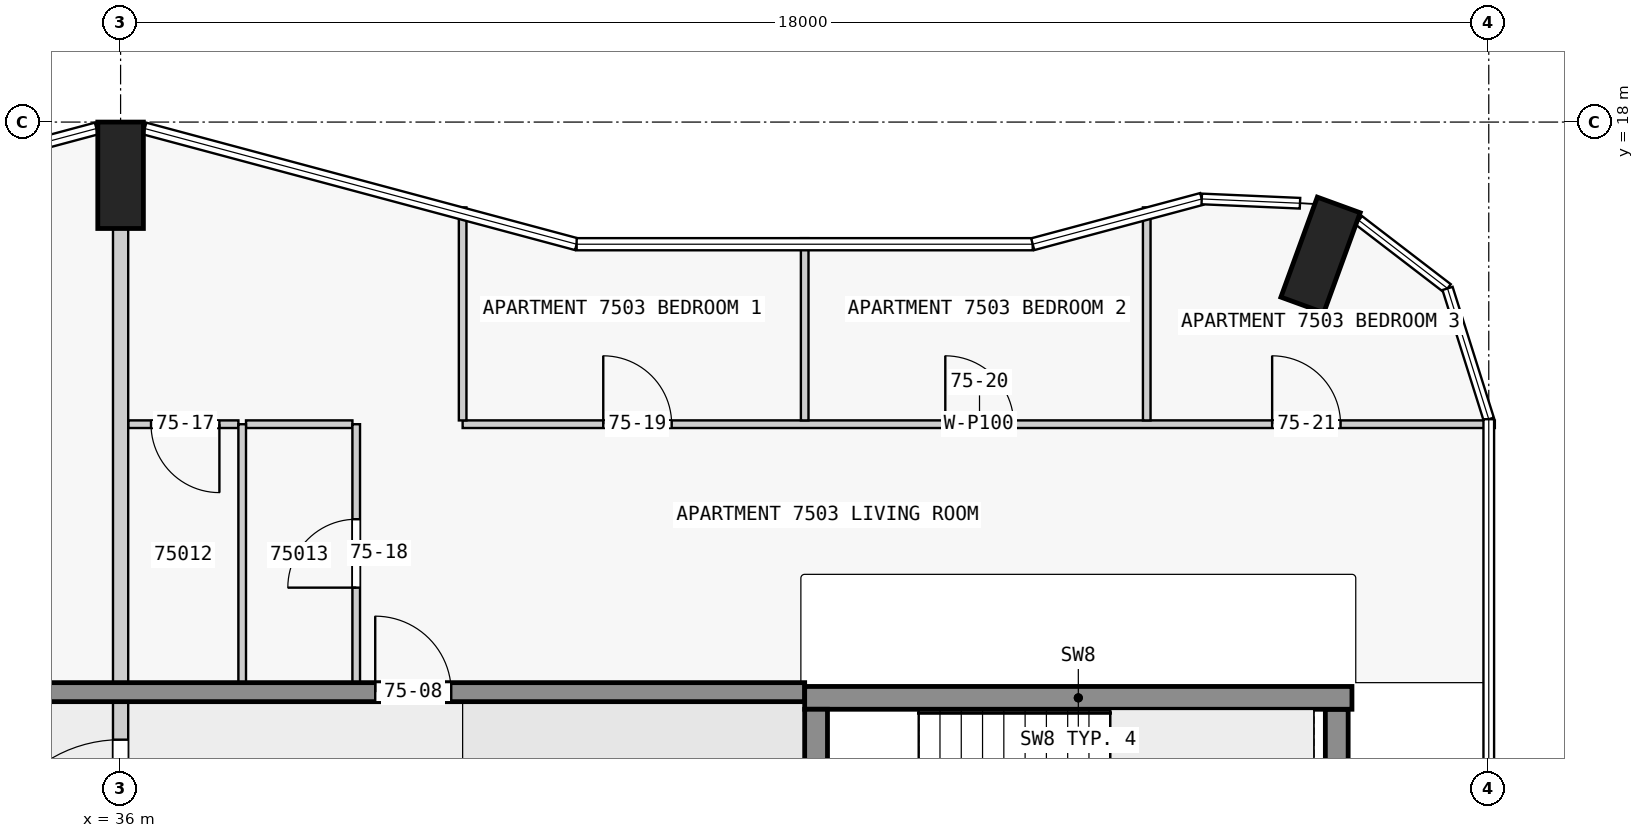
"""IFC4 building model, lengths in metres.
Left out: names, types, materials, properties, quantities, classifications, styles, units other than length and angle.
Written with IfcOpenShell. Run it as: python <this file> out.ifc"""

import sys

from ifc_helpers import new_model, si_unit, direction, frame, frame_2d, origin, origin_2d, place, context, subcontext, project, spatial, rectangle, extrude, element, fill, save


model = new_model("IFC4")
c1 = context("Model", 3, precision=1e-05, world=origin(), true_north=direction((0.0, 1.0)))
c2 = subcontext(c1, "Body", "Model", "MODEL_VIEW")
j1 = project(units=[si_unit("LENGTHUNIT", "METRE"), si_unit("PLANEANGLEUNIT", "RADIAN")], contexts=[c1])
p1 = place(None, origin())
s1 = spatial("IfcSite", under=j1, at=p1, CompositionType="ELEMENT")
p2 = place(p1, origin())
s2 = spatial("IfcBuilding", under=s1, at=p2, CompositionType="ELEMENT")
p3 = place(p2, frame((0.0, 0.0, 284.4)))
s3 = spatial("IfcBuildingStorey", under=s2, at=p3, CompositionType="ELEMENT", Elevation=284.4)
for number, where, z_axis, x_axis in (
    (1, (51.787, 16.252, 0.0), (0.0, 0.0, 1.0), (-0.94, 0.342, 0.0)),
    (2, (36.0, 17.3, 0.0), (0.0, 0.0, 1.0), (1.0, 0.0, 0.0)),
):
    element("IfcColumn", number, at=place(p3, frame(where, z_axis=z_axis, x_axis=x_axis)), inside=s3, PredefinedType="COLUMN", context=c2, shape_type="SweptSolid", body=[
        extrude(rectangle(XDim=0.6, YDim=1.4, at=origin_2d()), origin(), (0.0, 0.0, 1.0), 3.5),
    ])
p4 = place(p3, frame((45.15, 7.725, 0.0), z_axis=(0.0, 0.0, 1.0), x_axis=(0.0, 1.0, 0.0)))
e3 = element("IfcWall", 3, at=p4, inside=s3, PredefinedType="SHEAR", context=c2, shape_type="SweptSolid", body=[
    extrude(rectangle(XDim=2.55, YDim=0.3, at=frame_2d((1.275, 0.0))), origin(), (0.0, 0.0, 1.0), 3.5),
])
p5 = place(p4, frame((0.725, 0.0, 0.0)))
e4 = element("IfcOpeningElement", 4, at=p5, cuts=e3, PredefinedType="OPENING", context=c2, shape_type="SweptSolid", body=[
    extrude(rectangle(XDim=1.1, YDim=2.1, at=frame_2d((0.55, 1.05))), frame((0.0, 0.16, 0.0), z_axis=(0.0, -1.0, 0.0), x_axis=(1.0, 0.0, 0.0)), (0.0, 0.0, 1.0), 0.32),
])
p6 = place(p3, frame((52.0, 7.725, 0.0), z_axis=(0.0, 0.0, 1.0), x_axis=(0.0, 1.0, 0.0)))
e5 = element("IfcWall", 5, at=p6, inside=s3, PredefinedType="SHEAR", context=c2, shape_type="SweptSolid", body=[
    extrude(rectangle(XDim=2.55, YDim=0.3, at=frame_2d((1.275, 0.0))), origin(), (0.0, 0.0, 1.0), 3.5),
])
p7 = place(p3, frame((45.0, 10.425, 0.0), z_axis=(0.0, 0.0, 1.0), x_axis=(1.0, 0.0, 0.0)))
e6 = element("IfcWall", 6, at=p7, inside=s3, PredefinedType="SHEAR", context=c2, shape_type="SweptSolid", body=[
    extrude(rectangle(XDim=7.2, YDim=0.3, at=frame_2d((3.6, 0.0))), origin(), (0.0, 0.0, 1.0), 3.5),
])
p8 = place(p3, frame((22.5, 10.5, 0.0), z_axis=(0.0, 0.0, 1.0), x_axis=(1.0, 0.0, 0.0)))
e7 = element("IfcWall", 7, at=p8, inside=s3, PredefinedType="SHEAR", context=c2, shape_type="SweptSolid", body=[
    extrude(rectangle(XDim=22.5, YDim=0.25, at=frame_2d((11.25, 0.0))), origin(), (0.0, 0.0, 1.0), 3.05),
])
p9 = place(p8, frame((4.05, 0.0, 0.0)))
e8 = element("IfcOpeningElement", 8, at=p9, cuts=e7, PredefinedType="OPENING", context=c2, shape_type="SweptSolid", body=[
    extrude(rectangle(XDim=1.0, YDim=2.1, at=frame_2d((0.5, 1.05))), frame((0.0, 0.135, 0.0), z_axis=(0.0, -1.0, 0.0), x_axis=(1.0, 0.0, 0.0)), (0.0, 0.0, 1.0), 0.27),
])
p10 = place(p8, frame((10.35, 0.0, 0.0)))
e9 = element("IfcOpeningElement", 9, at=p10, cuts=e7, PredefinedType="OPENING", context=c2, shape_type="SweptSolid", body=[
    extrude(rectangle(XDim=1.8, YDim=2.1, at=frame_2d((0.9, 1.05))), frame((0.0, 0.135, 0.0), z_axis=(0.0, -1.0, 0.0), x_axis=(1.0, 0.0, 0.0)), (0.0, 0.0, 1.0), 0.27),
])
p11 = place(p8, frame((16.85, 0.0, 0.0)))
e10 = element("IfcOpeningElement", 10, at=p11, cuts=e7, PredefinedType="OPENING", context=c2, shape_type="SweptSolid", body=[
    extrude(rectangle(XDim=1.0, YDim=2.1, at=frame_2d((0.5, 1.05))), frame((0.0, 0.135, 0.0), z_axis=(0.0, -1.0, 0.0), x_axis=(1.0, 0.0, 0.0)), (0.0, 0.0, 1.0), 0.27),
])
p12 = place(p3, frame((37.55, 14.025, 0.0), z_axis=(0.0, 0.0, 1.0), x_axis=(-1.0, 0.0, 0.0)))
e11 = element("IfcWall", 11, at=p12, inside=s3, PredefinedType="PARTITIONING", context=c2, shape_type="SweptSolid", body=[
    extrude(rectangle(XDim=1.45, YDim=0.1, at=frame_2d((0.725, 0.0))), origin(), (0.0, 0.0, 1.0), 3.05),
])
p13 = place(p12, frame((0.25, 0.0, 0.0)))
e12 = element("IfcOpeningElement", 12, at=p13, cuts=e11, PredefinedType="OPENING", context=c2, shape_type="SweptSolid", body=[
    extrude(rectangle(XDim=0.9, YDim=2.1, at=frame_2d((0.45, 1.05))), frame((0.0, 0.06, 0.0), z_axis=(0.0, -1.0, 0.0), x_axis=(1.0, 0.0, 0.0)), (0.0, 0.0, 1.0), 0.12),
])
p14 = place(p3, frame((39.05, 14.025, 0.0), z_axis=(0.0, 0.0, 1.0), x_axis=(-1.0, 0.0, 0.0)))
e13 = element("IfcWall", 13, at=p14, inside=s3, PredefinedType="PARTITIONING", context=c2, shape_type="SweptSolid", body=[
    extrude(rectangle(XDim=1.4, YDim=0.1, at=frame_2d((0.7, 0.0))), origin(), (0.0, 0.0, 1.0), 3.05),
])
p15 = place(p3, frame((40.5, 14.025, 0.0), z_axis=(0.0, 0.0, 1.0), x_axis=(1.0, 0.0, 0.0)))
e14 = element("IfcWall", 14, at=p15, inside=s3, PredefinedType="PARTITIONING", context=c2, shape_type="SweptSolid", body=[
    extrude(rectangle(XDim=13.58, YDim=0.1, at=frame_2d((6.79, 0.0))), origin(), (0.0, 0.0, 1.0), 3.05),
])
p16 = place(p15, frame((1.85, 0.0, 0.0)))
e15 = element("IfcOpeningElement", 15, at=p16, cuts=e14, PredefinedType="OPENING", context=c2, shape_type="SweptSolid", body=[
    extrude(rectangle(XDim=0.9, YDim=2.1, at=frame_2d((0.45, 1.05))), frame((0.0, 0.06, 0.0), z_axis=(0.0, -1.0, 0.0), x_axis=(1.0, 0.0, 0.0)), (0.0, 0.0, 1.0), 0.12),
])
p17 = place(p15, frame((6.35, 0.0, 0.0)))
e16 = element("IfcOpeningElement", 16, at=p17, cuts=e14, PredefinedType="OPENING", context=c2, shape_type="SweptSolid", body=[
    extrude(rectangle(XDim=0.9, YDim=2.1, at=frame_2d((0.45, 1.05))), frame((0.0, 0.06, 0.0), z_axis=(0.0, -1.0, 0.0), x_axis=(1.0, 0.0, 0.0)), (0.0, 0.0, 1.0), 0.12),
])
p18 = place(p15, frame((10.65, 0.0, 0.0)))
e17 = element("IfcOpeningElement", 17, at=p18, cuts=e14, PredefinedType="OPENING", context=c2, shape_type="SweptSolid", body=[
    extrude(rectangle(XDim=0.9, YDim=2.1, at=frame_2d((0.45, 1.05))), frame((0.0, 0.06, 0.0), z_axis=(0.0, -1.0, 0.0), x_axis=(1.0, 0.0, 0.0)), (0.0, 0.0, 1.0), 0.12),
])
p19 = place(p3, frame((36.0, 10.625, 0.0), z_axis=(0.0, 0.0, 1.0), x_axis=(0.0, 1.0, 0.0)))
e18 = element("IfcWall", 18, at=p19, inside=s3, PredefinedType="PARTITIONING", context=c2, shape_type="SweptSolid", body=[
    extrude(rectangle(XDim=5.975, YDim=0.2, at=frame_2d((2.988, 0.0))), origin(), (0.0, 0.0, 1.0), 3.05),
])
p20 = place(p3, frame((37.6, 10.625, 0.0), z_axis=(0.0, 0.0, 1.0), x_axis=(0.0, 1.0, 0.0)))
e19 = element("IfcWall", 19, at=p20, inside=s3, PredefinedType="PARTITIONING", context=c2, shape_type="SweptSolid", body=[
    extrude(rectangle(XDim=3.4, YDim=0.1, at=frame_2d((1.7, 0.0))), origin(), (0.0, 0.0, 1.0), 3.05),
])
p21 = place(p3, frame((39.1, 10.625, 0.0), z_axis=(0.0, 0.0, 1.0), x_axis=(0.0, 1.0, 0.0)))
e20 = element("IfcWall", 20, at=p21, inside=s3, PredefinedType="PARTITIONING", context=c2, shape_type="SweptSolid", body=[
    extrude(rectangle(XDim=3.4, YDim=0.1, at=frame_2d((1.7, 0.0))), origin(), (0.0, 0.0, 1.0), 3.05),
])
p22 = place(p21, frame((1.25, 0.0, 0.0)))
e21 = element("IfcOpeningElement", 21, at=p22, cuts=e20, PredefinedType="OPENING", context=c2, shape_type="SweptSolid", body=[
    extrude(rectangle(XDim=0.9, YDim=2.1, at=frame_2d((0.45, 1.05))), frame((0.0, 0.06, 0.0), z_axis=(0.0, -1.0, 0.0), x_axis=(1.0, 0.0, 0.0)), (0.0, 0.0, 1.0), 0.12),
])
p23 = place(p3, frame((40.5, 16.878, 0.0), z_axis=(0.0, 0.0, 1.0), x_axis=(0.0, -1.0, 0.0)))
e22 = element("IfcWall", 22, at=p23, inside=s3, PredefinedType="PARTITIONING", context=c2, shape_type="SweptSolid", body=[
    extrude(rectangle(XDim=2.803, YDim=0.1, at=frame_2d((1.401, 0.0))), origin(), (0.0, 0.0, 1.0), 3.05),
])
p24 = place(p3, frame((45.0, 14.075, 0.0), z_axis=(0.0, 0.0, 1.0), x_axis=(0.0, 1.0, 0.0)))
e23 = element("IfcWall", 23, at=p24, inside=s3, PredefinedType="PARTITIONING", context=c2, shape_type="SweptSolid", body=[
    extrude(rectangle(XDim=2.398, YDim=0.1, at=frame_2d((1.199, 0.0))), origin(), (0.0, 0.0, 1.0), 3.05),
])
p25 = place(p3, frame((49.5, 14.075, 0.0), z_axis=(0.0, 0.0, 1.0), x_axis=(0.0, 1.0, 0.0)))
e24 = element("IfcWall", 24, at=p25, inside=s3, PredefinedType="PARTITIONING", context=c2, shape_type="SweptSolid", body=[
    extrude(rectangle(XDim=2.803, YDim=0.1, at=frame_2d((1.401, 0.0))), origin(), (0.0, 0.0, 1.0), 3.05),
])
p26 = place(p3, frame((36.0, 7.475, 0.0), z_axis=(0.0, 0.0, 1.0), x_axis=(0.0, 1.0, 0.0)))
e25 = element("IfcWall", 25, at=p26, inside=s3, PredefinedType="PARTITIONING", context=c2, shape_type="SweptSolid", body=[
    extrude(rectangle(XDim=3.05, YDim=0.2, at=frame_2d((1.525, 0.0))), origin(), (0.0, 0.0, 1.0), 3.05),
])
p27 = place(p26, frame((0.6, 0.0, 0.0)))
e26 = element("IfcOpeningElement", 26, at=p27, cuts=e25, PredefinedType="OPENING", context=c2, shape_type="SweptSolid", body=[
    extrude(rectangle(XDim=1.8, YDim=2.1, at=frame_2d((0.9, 1.05))), frame((0.0, 0.11, 0.0), z_axis=(0.0, -1.0, 0.0), x_axis=(1.0, 0.0, 0.0)), (0.0, 0.0, 1.0), 0.22),
])
p28 = place(p11, origin())
e27 = element("IfcDoor", 27, at=p28, inside=s3, OperationType="SINGLE_SWING_RIGHT", PredefinedType="DOOR", context=c2, shape_type="SweptSolid", body=[
    extrude(rectangle(XDim=1.0, YDim=2.1, at=frame_2d((0.5, 1.05))), frame((0.0, 0.025, 0.0), z_axis=(0.0, -1.0, 0.0), x_axis=(1.0, 0.0, 0.0)), (0.0, 0.0, 1.0), 0.05),
])
fill(e10, e27)
p29 = place(p27, origin())
e28 = element("IfcDoor", 28, at=p29, inside=s3, OperationType="SINGLE_SWING_LEFT", PredefinedType="DOOR", context=c2, shape_type="SweptSolid", body=[
    extrude(rectangle(XDim=1.8, YDim=2.1, at=frame_2d((0.9, 1.05))), frame((0.0, 0.025, 0.0), z_axis=(0.0, -1.0, 0.0), x_axis=(1.0, 0.0, 0.0)), (0.0, 0.0, 1.0), 0.05),
])
fill(e26, e28)
p30 = place(p13, origin())
e29 = element("IfcDoor", 29, at=p30, inside=s3, OperationType="SINGLE_SWING_LEFT", PredefinedType="DOOR", context=c2, shape_type="SweptSolid", body=[
    extrude(rectangle(XDim=0.9, YDim=2.1, at=frame_2d((0.45, 1.05))), frame((0.0, 0.025, 0.0), z_axis=(0.0, -1.0, 0.0), x_axis=(1.0, 0.0, 0.0)), (0.0, 0.0, 1.0), 0.05),
])
fill(e12, e29)
p31 = place(p22, origin())
e30 = element("IfcDoor", 30, at=p31, inside=s3, OperationType="SINGLE_SWING_LEFT", PredefinedType="DOOR", context=c2, shape_type="SweptSolid", body=[
    extrude(rectangle(XDim=0.9, YDim=2.1, at=frame_2d((0.45, 1.05))), frame((0.0, 0.025, 0.0), z_axis=(0.0, -1.0, 0.0), x_axis=(1.0, 0.0, 0.0)), (0.0, 0.0, 1.0), 0.05),
])
fill(e21, e30)
p32 = place(p16, origin())
e31 = element("IfcDoor", 31, at=p32, inside=s3, OperationType="SINGLE_SWING_LEFT", PredefinedType="DOOR", context=c2, shape_type="SweptSolid", body=[
    extrude(rectangle(XDim=0.9, YDim=2.1, at=frame_2d((0.45, 1.05))), frame((0.0, 0.025, 0.0), z_axis=(0.0, -1.0, 0.0), x_axis=(1.0, 0.0, 0.0)), (0.0, 0.0, 1.0), 0.05),
])
fill(e15, e31)
p33 = place(p17, origin())
e32 = element("IfcDoor", 32, at=p33, inside=s3, OperationType="SINGLE_SWING_RIGHT", PredefinedType="DOOR", context=c2, shape_type="SweptSolid", body=[
    extrude(rectangle(XDim=0.9, YDim=2.1, at=frame_2d((0.45, 1.05))), frame((0.0, 0.025, 0.0), z_axis=(0.0, -1.0, 0.0), x_axis=(1.0, 0.0, 0.0)), (0.0, 0.0, 1.0), 0.05),
])
fill(e16, e32)
p34 = place(p18, origin())
e33 = element("IfcDoor", 33, at=p34, inside=s3, OperationType="SINGLE_SWING_RIGHT", PredefinedType="DOOR", context=c2, shape_type="SweptSolid", body=[
    extrude(rectangle(XDim=0.9, YDim=2.1, at=frame_2d((0.45, 1.05))), frame((0.0, 0.025, 0.0), z_axis=(0.0, -1.0, 0.0), x_axis=(1.0, 0.0, 0.0)), (0.0, 0.0, 1.0), 0.05),
])
fill(e17, e33)
save(model, sys.argv[1])
